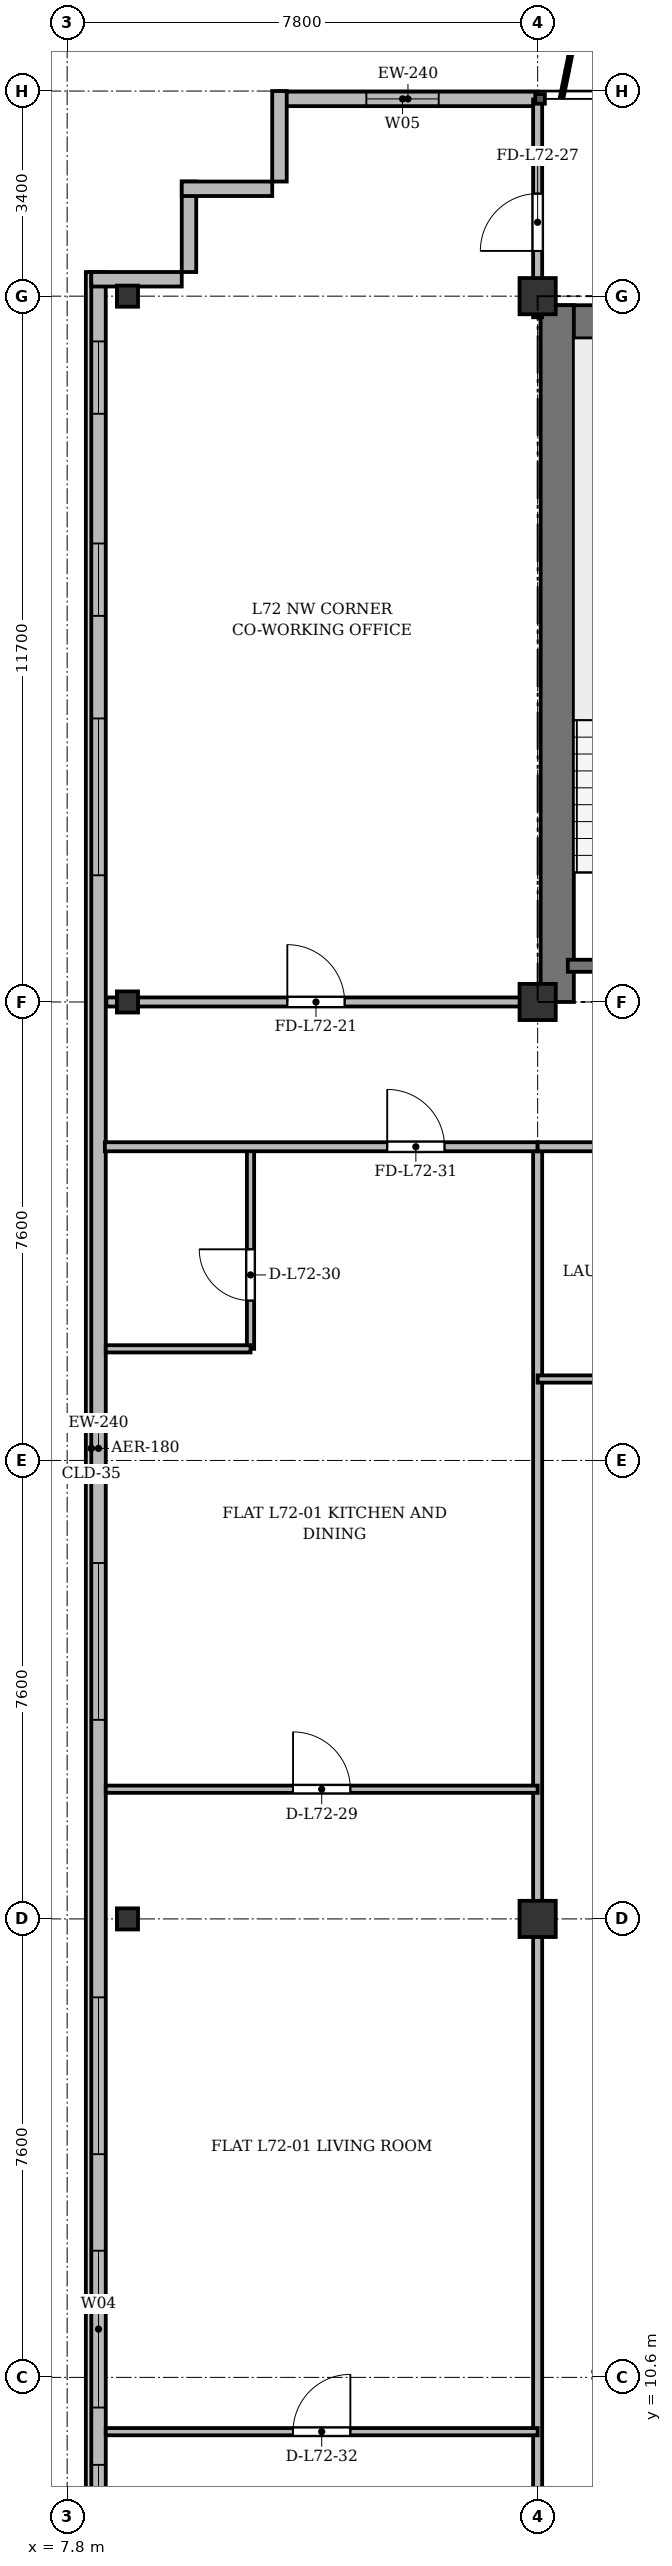
"""IFC4 building model, lengths in metres.
Left out: names, types, materials, properties, quantities, classifications, styles, units other than length and angle.
Written with IfcOpenShell. Run it as: python <this file> out.ifc"""

import sys

from ifc_helpers import new_model, si_unit, direction, frame, frame_2d, origin, origin_2d, place, context, subcontext, project, spatial, rectangle, i_section, extrude, source, transform, mapped, element, fill, save


model = new_model("IFC4")
c1 = context("Model", 3, precision=1e-05, world=origin(), true_north=direction((0.0, 1.0)))
c2 = subcontext(c1, "Body", "Model", "MODEL_VIEW")
j1 = project(units=[si_unit("LENGTHUNIT", "METRE"), si_unit("PLANEANGLEUNIT", "RADIAN")], contexts=[c1])
p1 = place(None, origin())
s1 = spatial("IfcSite", under=j1, at=p1, CompositionType="ELEMENT")
p2 = place(p1, origin())
s2 = spatial("IfcBuilding", under=s1, at=p2, CompositionType="ELEMENT")
p3 = place(p2, frame((0.0, 0.0, 277.5)))
s3 = spatial("IfcBuildingStorey", under=s2, at=p3, CompositionType="ELEMENT", Elevation=277.5)
m1 = source(origin(), c2, "Body", "SweptSolid", [
    extrude(i_section(OverallWidth=0.35, OverallDepth=0.35, WebThickness=0.018, FlangeThickness=0.028, at=origin_2d()), origin(), (0.0, 0.0, 1.0), 3.6),
])
for number, where, z_axis, x_axis in (
    (1, (8.8, 18.2, 0.0), (0.0, 0.0, 1.0), (1.0, 0.0, 0.0)),
    (2, (8.8, 33.4, 0.0), (0.0, 0.0, 1.0), (1.0, 0.0, 0.0)),
    (3, (8.8, 45.1, 0.0), (0.0, 0.0, 1.0), (1.0, 0.0, 0.0)),
):
    element("IfcColumn", number, at=place(p3, frame(where, z_axis=z_axis, x_axis=x_axis)), inside=s3, PredefinedType="COLUMN", context=c2, shape_type="MappedRepresentation", body=[
        mapped(m1, transform((0.0, 0.0, 0.0), x_axis=(1.0, 0.0, 0.0), y_axis=(0.0, 1.0, 0.0), z_axis=(0.0, 0.0, 1.0), scale=1.0)),
    ])
m2 = source(origin(), c2, "Body", "SweptSolid", [
    extrude(rectangle(XDim=0.6, YDim=0.6, at=origin_2d()), origin(), (0.0, 0.0, 1.0), 3.6),
])
for number, where, z_axis, x_axis in (
    (4, (15.6, 18.2, 0.0), (0.0, 0.0, 1.0), (1.0, 0.0, 0.0)),
    (5, (15.6, 33.4, 0.0), (0.0, 0.0, 1.0), (1.0, 0.0, 0.0)),
    (6, (15.6, 45.1, 0.0), (0.0, 0.0, 1.0), (1.0, 0.0, 0.0)),
):
    element("IfcColumn", number, at=place(p3, frame(where, z_axis=z_axis, x_axis=x_axis)), inside=s3, PredefinedType="COLUMN", context=c2, shape_type="MappedRepresentation", body=[
        mapped(m2, transform((0.0, 0.0, 0.0), x_axis=(1.0, 0.0, 0.0), y_axis=(0.0, 1.0, 0.0), z_axis=(0.0, 0.0, 1.0), scale=1.0)),
    ])
p4 = place(p3, frame((11.3, 48.37, 0.0), z_axis=(0.0, 0.0, 1.0), x_axis=(1.0, 0.0, 0.0)))
e7 = element("IfcWall", 7, at=p4, inside=s3, PredefinedType="SOLIDWALL", context=c2, shape_type="SweptSolid", body=[
    extrude(rectangle(XDim=4.3, YDim=0.24, at=frame_2d((2.15, 0.0))), origin(), (0.0, 0.0, 1.0), 3.37),
])
p5 = place(p4, frame((1.46, 0.0, 0.9)))
e8 = element("IfcOpeningElement", 8, at=p5, cuts=e7, PredefinedType="OPENING", context=c2, shape_type="SweptSolid", body=[
    extrude(rectangle(XDim=1.2, YDim=1.65, at=frame_2d((0.6, 0.825))), frame((0.0, 0.13, 0.0), z_axis=(0.0, -1.0, 0.0), x_axis=(1.0, 0.0, 0.0)), (0.0, 0.0, 1.0), 0.26),
])
p6 = place(p3, frame((8.32, 6.5, 0.0), z_axis=(0.0, 0.0, 1.0), x_axis=(0.0, 1.0, 0.0)))
e9 = element("IfcWall", 9, at=p6, inside=s3, PredefinedType="SOLIDWALL", context=c2, shape_type="SweptSolid", body=[
    extrude(rectangle(XDim=39.0, YDim=0.24, at=frame_2d((19.5, 0.0))), origin(), (0.0, 0.0, 1.0), 3.37),
])
p7 = place(p6, frame((1.45, 0.0, 0.92)))
e10 = element("IfcOpeningElement", 10, at=p7, cuts=e9, PredefinedType="OPENING", context=c2, shape_type="SweptSolid", body=[
    extrude(rectangle(XDim=1.2, YDim=1.65, at=frame_2d((0.6, 0.825))), frame((0.0, 0.13, 0.0), z_axis=(0.0, -1.0, 0.0), x_axis=(1.0, 0.0, 0.0)), (0.0, 0.0, 1.0), 0.26),
])
p8 = place(p6, frame((3.6, 0.0, 0.92)))
e11 = element("IfcOpeningElement", 11, at=p8, cuts=e9, PredefinedType="OPENING", context=c2, shape_type="SweptSolid", body=[
    extrude(rectangle(XDim=2.6, YDim=1.9, at=frame_2d((1.3, 0.95))), frame((0.0, 0.13, 0.0), z_axis=(0.0, -1.0, 0.0), x_axis=(1.0, 0.0, 0.0)), (0.0, 0.0, 1.0), 0.26),
])
p9 = place(p6, frame((7.8, 0.0, 0.92)))
e12 = element("IfcOpeningElement", 12, at=p9, cuts=e9, PredefinedType="OPENING", context=c2, shape_type="SweptSolid", body=[
    extrude(rectangle(XDim=2.6, YDim=1.9, at=frame_2d((1.3, 0.95))), frame((0.0, 0.13, 0.0), z_axis=(0.0, -1.0, 0.0), x_axis=(1.0, 0.0, 0.0)), (0.0, 0.0, 1.0), 0.26),
])
p10 = place(p6, frame((15.0, 0.0, 0.92)))
e13 = element("IfcOpeningElement", 13, at=p10, cuts=e9, PredefinedType="OPENING", context=c2, shape_type="SweptSolid", body=[
    extrude(rectangle(XDim=2.6, YDim=1.9, at=frame_2d((1.3, 0.95))), frame((0.0, 0.13, 0.0), z_axis=(0.0, -1.0, 0.0), x_axis=(1.0, 0.0, 0.0)), (0.0, 0.0, 1.0), 0.26),
])
p11 = place(p6, frame((29.0, 0.0, 0.92)))
e14 = element("IfcOpeningElement", 14, at=p11, cuts=e9, PredefinedType="OPENING", context=c2, shape_type="SweptSolid", body=[
    extrude(rectangle(XDim=2.6, YDim=1.9, at=frame_2d((1.3, 0.95))), frame((0.0, 0.13, 0.0), z_axis=(0.0, -1.0, 0.0), x_axis=(1.0, 0.0, 0.0)), (0.0, 0.0, 1.0), 0.26),
])
p12 = place(p6, frame((33.3, 0.0, 0.92)))
e15 = element("IfcOpeningElement", 15, at=p12, cuts=e9, PredefinedType="OPENING", context=c2, shape_type="SweptSolid", body=[
    extrude(rectangle(XDim=1.2, YDim=1.65, at=frame_2d((0.6, 0.825))), frame((0.0, 0.13, 0.0), z_axis=(0.0, -1.0, 0.0), x_axis=(1.0, 0.0, 0.0)), (0.0, 0.0, 1.0), 0.26),
])
p13 = place(p6, frame((36.65, 0.0, 0.92)))
e16 = element("IfcOpeningElement", 16, at=p13, cuts=e9, PredefinedType="OPENING", context=c2, shape_type="SweptSolid", body=[
    extrude(rectangle(XDim=1.2, YDim=1.65, at=frame_2d((0.6, 0.825))), frame((0.0, 0.13, 0.0), z_axis=(0.0, -1.0, 0.0), x_axis=(1.0, 0.0, 0.0)), (0.0, 0.0, 1.0), 0.26),
])
for number, where, z_axis, x_axis in (
    (17, (8.2, 45.38, 0.0), (0.0, 0.0, 1.0), (1.0, 0.0, 0.0)),
    (18, (9.82, 45.5, 0.0), (0.0, 0.0, 1.0), (0.0, 1.0, 0.0)),
    (19, (9.7, 46.88, 0.0), (0.0, 0.0, 1.0), (1.0, 0.0, 0.0)),
    (20, (11.32, 47.0, 0.0), (0.0, 0.0, 1.0), (0.0, 1.0, 0.0)),
):
    element("IfcWall", number, at=place(p3, frame(where, z_axis=z_axis, x_axis=x_axis)), inside=s3, PredefinedType="SOLIDWALL", context=c2, shape_type="SweptSolid", body=[
        extrude(rectangle(XDim=1.5, YDim=0.24, at=frame_2d((0.75, 0.0))), origin(), (0.0, 0.0, 1.0), 3.37),
    ])
p14 = place(p3, frame((15.65, 44.675, 0.0), z_axis=(0.0, 0.0, 1.0), x_axis=(1.0, 0.0, 0.0)))
e21 = element("IfcWall", 21, at=p14, inside=s3, PredefinedType="SHEAR", context=c2, shape_type="SweptSolid", body=[
    extrude(rectangle(XDim=43.1, YDim=0.55, at=frame_2d((21.55, 0.0))), origin(), (0.0, 0.0, 1.0), 3.37),
])
p15 = place(p3, frame((15.925, 33.4, 0.0), z_axis=(0.0, 0.0, 1.0), x_axis=(0.0, 1.0, 0.0)))
e22 = element("IfcWall", 22, at=p15, inside=s3, PredefinedType="SHEAR", context=c2, shape_type="SweptSolid", body=[
    extrude(rectangle(XDim=11.55, YDim=0.55, at=frame_2d((5.775, 0.0))), origin(), (0.0, 0.0, 1.0), 3.37),
])
p16 = place(p3, frame((16.1, 34.0, 0.0), z_axis=(0.0, 0.0, 1.0), x_axis=(1.0, 0.0, 0.0)))
e23 = element("IfcWall", 23, at=p16, inside=s3, PredefinedType="SHEAR", context=c2, shape_type="SweptSolid", body=[
    extrude(rectangle(XDim=3.4, YDim=0.2, at=frame_2d((1.7, 0.0))), origin(), (0.0, 0.0, 1.0), 3.37),
])
p17 = place(p3, frame((8.45, 33.4, 0.0), z_axis=(0.0, 0.0, 1.0), x_axis=(1.0, 0.0, 0.0)))
e24 = element("IfcWall", 24, at=p17, inside=s3, PredefinedType="PARTITIONING", context=c2, shape_type="SweptSolid", body=[
    extrude(rectangle(XDim=7.15, YDim=0.15, at=frame_2d((3.575, 0.0))), origin(), (0.0, 0.0, 1.0), 2.92),
])
p18 = place(p17, frame((3.0, 0.0, 0.0)))
e25 = element("IfcOpeningElement", 25, at=p18, cuts=e24, PredefinedType="OPENING", context=c2, shape_type="SweptSolid", body=[
    extrude(rectangle(XDim=0.95, YDim=2.15, at=frame_2d((0.475, 1.075))), frame((0.0, 0.085, 0.0), z_axis=(0.0, -1.0, 0.0), x_axis=(1.0, 0.0, 0.0)), (0.0, 0.0, 1.0), 0.17),
])
p19 = place(p3, frame((15.6, 44.75, 0.0), z_axis=(0.0, 0.0, 1.0), x_axis=(0.0, 1.0, 0.0)))
e26 = element("IfcWall", 26, at=p19, inside=s3, PredefinedType="PARTITIONING", context=c2, shape_type="SweptSolid", body=[
    extrude(rectangle(XDim=3.61, YDim=0.15, at=frame_2d((1.805, 0.0))), origin(), (0.0, 0.0, 1.0), 2.87),
])
p20 = place(p19, frame((1.1, 0.0, 0.0)))
e27 = element("IfcOpeningElement", 27, at=p20, cuts=e26, PredefinedType="OPENING", context=c2, shape_type="SweptSolid", body=[
    extrude(rectangle(XDim=0.95, YDim=2.15, at=frame_2d((0.475, 1.075))), frame((0.0, 0.085, 0.0), z_axis=(0.0, -1.0, 0.0), x_axis=(1.0, 0.0, 0.0)), (0.0, 0.0, 1.0), 0.17),
])
p21 = place(p3, frame((15.6, 3.725, 0.0), z_axis=(0.0, 0.0, 1.0), x_axis=(0.0, 1.0, 0.0)))
e28 = element("IfcWall", 28, at=p21, inside=s3, PredefinedType="PARTITIONING", context=c2, shape_type="SweptSolid", body=[
    extrude(rectangle(XDim=27.275, YDim=0.15, at=frame_2d((13.637, 0.0))), origin(), (0.0, 0.0, 1.0), 2.87),
])
p22 = place(p3, frame((8.44, 20.35, 0.0), z_axis=(0.0, 0.0, 1.0), x_axis=(1.0, 0.0, 0.0)))
e29 = element("IfcWall", 29, at=p22, inside=s3, PredefinedType="PARTITIONING", context=c2, shape_type="SweptSolid", body=[
    extrude(rectangle(XDim=7.16, YDim=0.12, at=frame_2d((3.58, 0.0))), origin(), (0.0, 0.0, 1.0), 2.87),
])
p23 = place(p22, frame((3.105, 0.0, 0.0)))
e30 = element("IfcOpeningElement", 30, at=p23, cuts=e29, PredefinedType="OPENING", context=c2, shape_type="SweptSolid", body=[
    extrude(rectangle(XDim=0.95, YDim=2.15, at=frame_2d((0.475, 1.075))), frame((0.0, 0.07, 0.0), z_axis=(0.0, -1.0, 0.0), x_axis=(1.0, 0.0, 0.0)), (0.0, 0.0, 1.0), 0.14),
])
p24 = place(p3, frame((10.84, 27.65, 0.0), z_axis=(0.0, 0.0, 1.0), x_axis=(0.0, 1.0, 0.0)))
e31 = element("IfcWall", 31, at=p24, inside=s3, PredefinedType="PARTITIONING", context=c2, shape_type="SweptSolid", body=[
    extrude(rectangle(XDim=3.35, YDim=0.12, at=frame_2d((1.675, 0.0))), origin(), (0.0, 0.0, 1.0), 3.37),
])
p25 = place(p24, frame((0.8, 0.0, 0.0)))
e32 = element("IfcOpeningElement", 32, at=p25, cuts=e31, PredefinedType="OPENING", context=c2, shape_type="SweptSolid", body=[
    extrude(rectangle(XDim=0.85, YDim=2.1, at=frame_2d((0.425, 1.05))), frame((0.0, 0.07, 0.0), z_axis=(0.0, -1.0, 0.0), x_axis=(1.0, 0.0, 0.0)), (0.0, 0.0, 1.0), 0.14),
])
p26 = place(p3, frame((8.44, 27.65, 0.0), z_axis=(0.0, 0.0, 1.0), x_axis=(1.0, 0.0, 0.0)))
e33 = element("IfcWall", 33, at=p26, inside=s3, PredefinedType="PARTITIONING", context=c2, shape_type="SweptSolid", body=[
    extrude(rectangle(XDim=2.4, YDim=0.12, at=frame_2d((1.2, 0.0))), origin(), (0.0, 0.0, 1.0), 2.87),
])
p27 = place(p3, frame((8.425, 31.0, 0.0), z_axis=(0.0, 0.0, 1.0), x_axis=(1.0, 0.0, 0.0)))
e34 = element("IfcWall", 34, at=p27, inside=s3, PredefinedType="PARTITIONING", context=c2, shape_type="SweptSolid", body=[
    extrude(rectangle(XDim=7.175, YDim=0.15, at=frame_2d((3.587, 0.0))), origin(), (0.0, 0.0, 1.0), 2.87),
])
p28 = place(p27, frame((4.681, 0.0, 0.0)))
e35 = element("IfcOpeningElement", 35, at=p28, cuts=e34, PredefinedType="OPENING", context=c2, shape_type="SweptSolid", body=[
    extrude(rectangle(XDim=0.95, YDim=2.15, at=frame_2d((0.475, 1.075))), frame((0.0, 0.085, 0.0), z_axis=(0.0, -1.0, 0.0), x_axis=(1.0, 0.0, 0.0)), (0.0, 0.0, 1.0), 0.17),
])
p29 = place(p3, frame((8.44, 9.7, 0.0), z_axis=(0.0, 0.0, 1.0), x_axis=(1.0, 0.0, 0.0)))
e36 = element("IfcWall", 36, at=p29, inside=s3, PredefinedType="PARTITIONING", context=c2, shape_type="SweptSolid", body=[
    extrude(rectangle(XDim=7.16, YDim=0.12, at=frame_2d((3.58, 0.0))), origin(), (0.0, 0.0, 1.0), 2.87),
])
p30 = place(p29, frame((3.105, 0.0, 0.0)))
e37 = element("IfcOpeningElement", 37, at=p30, cuts=e36, PredefinedType="OPENING", context=c2, shape_type="SweptSolid", body=[
    extrude(rectangle(XDim=0.95, YDim=2.15, at=frame_2d((0.475, 1.075))), frame((0.0, 0.07, 0.0), z_axis=(0.0, -1.0, 0.0), x_axis=(1.0, 0.0, 0.0)), (0.0, 0.0, 1.0), 0.14),
])
p31 = place(p3, frame((15.6, 31.0, 0.0), z_axis=(0.0, 0.0, 1.0), x_axis=(1.0, 0.0, 0.0)))
e38 = element("IfcWall", 38, at=p31, inside=s3, PredefinedType="PARTITIONING", context=c2, shape_type="SweptSolid", body=[
    extrude(rectangle(XDim=4.4, YDim=0.15, at=frame_2d((2.2, 0.0))), origin(), (0.0, 0.0, 1.0), 2.87),
])
p32 = place(p31, frame((1.725, 0.0, 0.0)))
e39 = element("IfcOpeningElement", 39, at=p32, cuts=e38, PredefinedType="OPENING", context=c2, shape_type="SweptSolid", body=[
    extrude(rectangle(XDim=0.95, YDim=2.15, at=frame_2d((0.475, 1.075))), frame((0.0, 0.085, 0.0), z_axis=(0.0, -1.0, 0.0), x_axis=(1.0, 0.0, 0.0)), (0.0, 0.0, 1.0), 0.17),
])
p33 = place(p3, frame((15.6, 27.15, 0.0), z_axis=(0.0, 0.0, 1.0), x_axis=(1.0, 0.0, 0.0)))
e40 = element("IfcWall", 40, at=p33, inside=s3, PredefinedType="PARTITIONING", context=c2, shape_type="SweptSolid", body=[
    extrude(rectangle(XDim=4.4, YDim=0.12, at=frame_2d((2.2, 0.0))), origin(), (0.0, 0.0, 1.0), 2.87),
])
p34 = place(p33, frame((1.725, 0.0, 0.0)))
e41 = element("IfcOpeningElement", 41, at=p34, cuts=e40, PredefinedType="OPENING", context=c2, shape_type="SweptSolid", body=[
    extrude(rectangle(XDim=0.95, YDim=2.15, at=frame_2d((0.475, 1.075))), frame((0.0, 0.07, 0.0), z_axis=(0.0, -1.0, 0.0), x_axis=(1.0, 0.0, 0.0)), (0.0, 0.0, 1.0), 0.14),
])
m3 = source(origin(), c2, "Body", "SweptSolid", [
    extrude(rectangle(XDim=1.2, YDim=1.65, at=frame_2d((0.6, 0.825))), frame((0.0, 0.03, 0.0), z_axis=(0.0, -1.0, 0.0), x_axis=(1.0, 0.0, 0.0)), (0.0, 0.0, 1.0), 0.06),
])
p35 = place(p5, origin())
e42 = element("IfcWindow", 42, at=p35, inside=s3, PartitioningType="SINGLE_PANEL", PredefinedType="WINDOW", context=c2, shape_type="MappedRepresentation", body=[
    mapped(m3, transform((0.0, 0.0, 0.0), x_axis=(1.0, 0.0, 0.0), y_axis=(0.0, 1.0, 0.0), z_axis=(0.0, 0.0, 1.0), scale=1.0)),
])
fill(e8, e42)
p36 = place(p7, origin())
e43 = element("IfcWindow", 43, at=p36, inside=s3, PartitioningType="SINGLE_PANEL", PredefinedType="WINDOW", context=c2, shape_type="MappedRepresentation", body=[
    mapped(m3, transform((0.0, 0.0, 0.0), x_axis=(1.0, 0.0, 0.0), y_axis=(0.0, 1.0, 0.0), z_axis=(0.0, 0.0, 1.0), scale=1.0)),
])
fill(e10, e43)
m4 = source(origin(), c2, "Body", "SweptSolid", [
    extrude(rectangle(XDim=2.6, YDim=1.9, at=frame_2d((1.3, 0.95))), frame((0.0, 0.03, 0.0), z_axis=(0.0, -1.0, 0.0), x_axis=(1.0, 0.0, 0.0)), (0.0, 0.0, 1.0), 0.06),
])
p37 = place(p8, origin())
e44 = element("IfcWindow", 44, at=p37, inside=s3, PartitioningType="SINGLE_PANEL", PredefinedType="WINDOW", context=c2, shape_type="MappedRepresentation", body=[
    mapped(m4, transform((0.0, 0.0, 0.0), x_axis=(1.0, 0.0, 0.0), y_axis=(0.0, 1.0, 0.0), z_axis=(0.0, 0.0, 1.0), scale=1.0)),
])
fill(e11, e44)
p38 = place(p9, origin())
e45 = element("IfcWindow", 45, at=p38, inside=s3, PartitioningType="SINGLE_PANEL", PredefinedType="WINDOW", context=c2, shape_type="MappedRepresentation", body=[
    mapped(m4, transform((0.0, 0.0, 0.0), x_axis=(1.0, 0.0, 0.0), y_axis=(0.0, 1.0, 0.0), z_axis=(0.0, 0.0, 1.0), scale=1.0)),
])
fill(e12, e45)
p39 = place(p10, origin())
e46 = element("IfcWindow", 46, at=p39, inside=s3, PartitioningType="SINGLE_PANEL", PredefinedType="WINDOW", context=c2, shape_type="MappedRepresentation", body=[
    mapped(m4, transform((0.0, 0.0, 0.0), x_axis=(1.0, 0.0, 0.0), y_axis=(0.0, 1.0, 0.0), z_axis=(0.0, 0.0, 1.0), scale=1.0)),
])
fill(e13, e46)
p40 = place(p11, origin())
e47 = element("IfcWindow", 47, at=p40, inside=s3, PartitioningType="SINGLE_PANEL", PredefinedType="WINDOW", context=c2, shape_type="MappedRepresentation", body=[
    mapped(m4, transform((0.0, 0.0, 0.0), x_axis=(1.0, 0.0, 0.0), y_axis=(0.0, 1.0, 0.0), z_axis=(0.0, 0.0, 1.0), scale=1.0)),
])
fill(e14, e47)
p41 = place(p12, origin())
e48 = element("IfcWindow", 48, at=p41, inside=s3, PartitioningType="SINGLE_PANEL", PredefinedType="WINDOW", context=c2, shape_type="MappedRepresentation", body=[
    mapped(m3, transform((0.0, 0.0, 0.0), x_axis=(1.0, 0.0, 0.0), y_axis=(0.0, 1.0, 0.0), z_axis=(0.0, 0.0, 1.0), scale=1.0)),
])
fill(e15, e48)
p42 = place(p13, origin())
e49 = element("IfcWindow", 49, at=p42, inside=s3, PartitioningType="SINGLE_PANEL", PredefinedType="WINDOW", context=c2, shape_type="MappedRepresentation", body=[
    mapped(m3, transform((0.0, 0.0, 0.0), x_axis=(1.0, 0.0, 0.0), y_axis=(0.0, 1.0, 0.0), z_axis=(0.0, 0.0, 1.0), scale=1.0)),
])
fill(e16, e49)
m5 = source(origin(), c2, "Body", "SweptSolid", [
    extrude(rectangle(XDim=0.95, YDim=2.15, at=frame_2d((0.475, 1.075))), frame((0.0, 0.025, 0.0), z_axis=(0.0, -1.0, 0.0), x_axis=(1.0, 0.0, 0.0)), (0.0, 0.0, 1.0), 0.05),
])
p43 = place(p18, origin())
e50 = element("IfcDoor", 50, at=p43, inside=s3, OperationType="SINGLE_SWING_LEFT", PredefinedType="DOOR", context=c2, shape_type="MappedRepresentation", body=[
    mapped(m5, transform((0.0, 0.0, 0.0), x_axis=(1.0, 0.0, 0.0), y_axis=(0.0, 1.0, 0.0), z_axis=(0.0, 0.0, 1.0), scale=1.0)),
])
fill(e25, e50)
p44 = place(p20, origin())
e51 = element("IfcDoor", 51, at=p44, inside=s3, OperationType="SINGLE_SWING_LEFT", PredefinedType="DOOR", context=c2, shape_type="MappedRepresentation", body=[
    mapped(m5, transform((0.0, 0.0, 0.0), x_axis=(1.0, 0.0, 0.0), y_axis=(0.0, 1.0, 0.0), z_axis=(0.0, 0.0, 1.0), scale=1.0)),
])
fill(e27, e51)
p45 = place(p23, origin())
e52 = element("IfcDoor", 52, at=p45, inside=s3, OperationType="SINGLE_SWING_LEFT", PredefinedType="DOOR", context=c2, shape_type="MappedRepresentation", body=[
    mapped(m5, transform((0.0, 0.0, 0.0), x_axis=(1.0, 0.0, 0.0), y_axis=(0.0, 1.0, 0.0), z_axis=(0.0, 0.0, 1.0), scale=1.0)),
])
fill(e30, e52)
m6 = source(origin(), c2, "Body", "SweptSolid", [
    extrude(rectangle(XDim=0.85, YDim=2.1, at=frame_2d((0.425, 1.05))), frame((0.0, 0.025, 0.0), z_axis=(0.0, -1.0, 0.0), x_axis=(1.0, 0.0, 0.0)), (0.0, 0.0, 1.0), 0.05),
])
p46 = place(p25, origin())
e53 = element("IfcDoor", 53, at=p46, inside=s3, OperationType="SINGLE_SWING_RIGHT", PredefinedType="DOOR", context=c2, shape_type="MappedRepresentation", body=[
    mapped(m6, transform((0.0, 0.0, 0.0), x_axis=(1.0, 0.0, 0.0), y_axis=(0.0, 1.0, 0.0), z_axis=(0.0, 0.0, 1.0), scale=1.0)),
])
fill(e32, e53)
p47 = place(p28, origin())
e54 = element("IfcDoor", 54, at=p47, inside=s3, OperationType="SINGLE_SWING_LEFT", PredefinedType="DOOR", context=c2, shape_type="MappedRepresentation", body=[
    mapped(m5, transform((0.0, 0.0, 0.0), x_axis=(1.0, 0.0, 0.0), y_axis=(0.0, 1.0, 0.0), z_axis=(0.0, 0.0, 1.0), scale=1.0)),
])
fill(e35, e54)
p48 = place(p30, origin())
e55 = element("IfcDoor", 55, at=p48, inside=s3, OperationType="SINGLE_SWING_RIGHT", PredefinedType="DOOR", context=c2, shape_type="MappedRepresentation", body=[
    mapped(m5, transform((0.0, 0.0, 0.0), x_axis=(1.0, 0.0, 0.0), y_axis=(0.0, 1.0, 0.0), z_axis=(0.0, 0.0, 1.0), scale=1.0)),
])
fill(e37, e55)
save(model, sys.argv[1])
